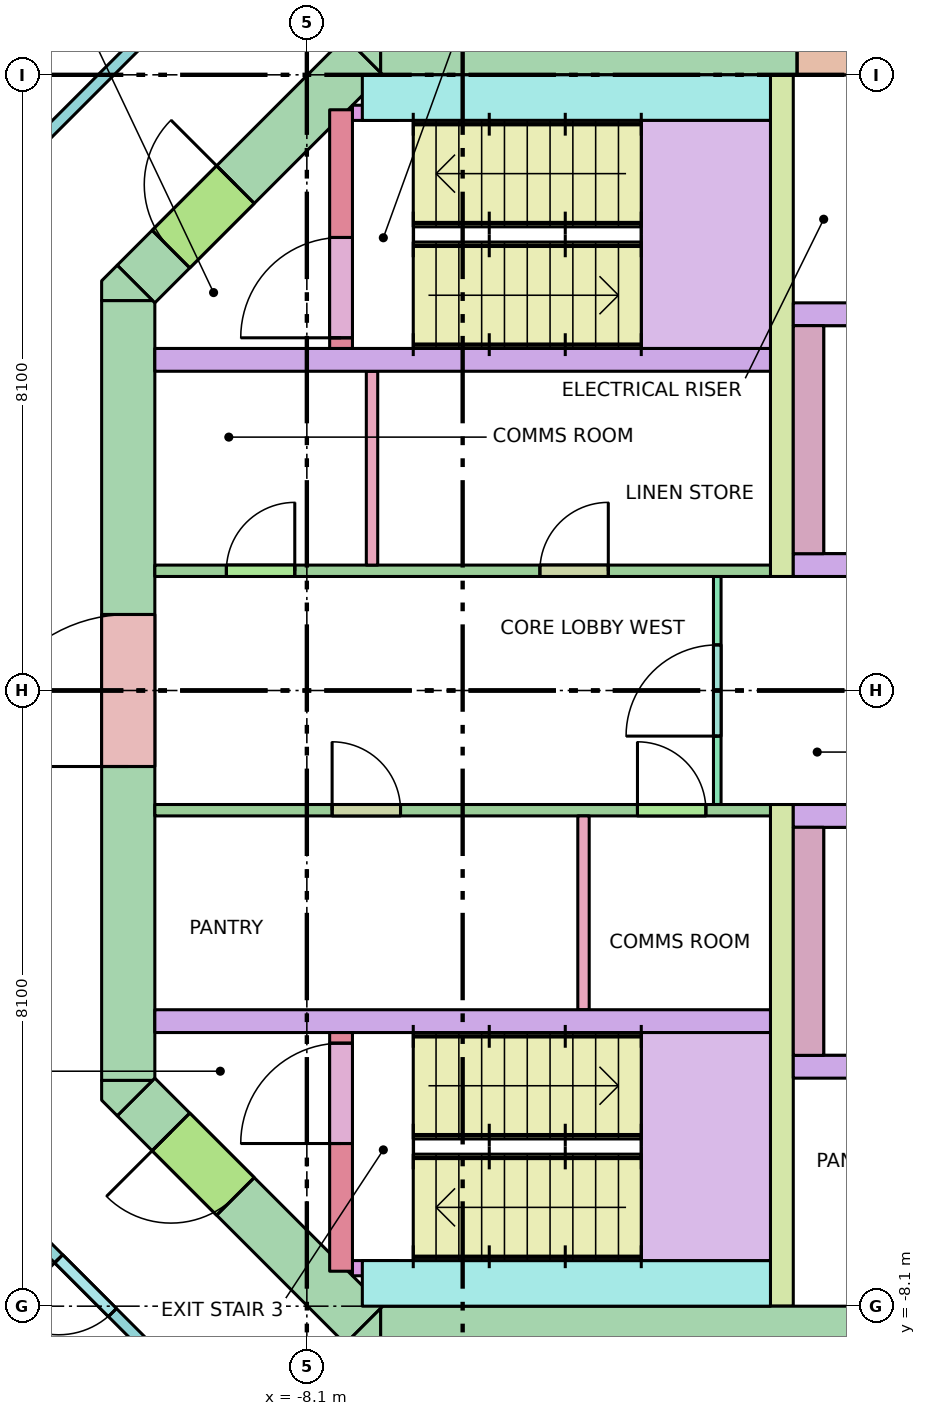
"""IFC4 building model, lengths in metres.
Left out: names, types, materials, properties, quantities, classifications, styles, units other than length and angle.
Written with IfcOpenShell. Run it as: python <this file> out.ifc"""

import sys

from ifc_helpers import new_model, si_unit, direction, frame, frame_2d, origin, place, context, subcontext, project, spatial, polyline, rectangle, outline, extrude, element, fill, save


model = new_model("IFC4")
c1 = context("Model", 3, precision=1e-05, world=origin(), true_north=direction((0.0, 1.0)))
c2 = subcontext(c1, "Body", "Model", "MODEL_VIEW")
j1 = project(units=[si_unit("LENGTHUNIT", "METRE"), si_unit("PLANEANGLEUNIT", "RADIAN")], contexts=[c1])
p1 = place(None, origin())
s1 = spatial("IfcSite", under=j1, at=p1, CompositionType="ELEMENT")
p2 = place(p1, origin())
s2 = spatial("IfcBuilding", under=s1, at=p2, CompositionType="ELEMENT")
p3 = place(p2, frame((0.0, 0.0, 176.4)))
s3 = spatial("IfcBuildingStorey", under=s2, at=p3, CompositionType="ELEMENT", Elevation=176.4)
p4 = place(p3, frame((-7.13, 8.45, -0.28), z_axis=(0.0, 0.0, 1.0), x_axis=(1.0, 0.0, 0.0)))
e1 = element("IfcWall", 1, at=p4, inside=s3, PredefinedType="SHEAR", context=c2, shape_type="SweptSolid", body=[
    extrude(rectangle(XDim=14.26, YDim=0.7, at=frame_2d((7.13, 0.0))), origin(), (0.0, 0.0, 1.0), 3.7),
])
p5 = place(p4, frame((5.48, 0.0, 0.28)))
e2 = element("IfcOpeningElement", 2, at=p5, cuts=e1, PredefinedType="OPENING", context=c2, shape_type="SweptSolid", body=[
    extrude(rectangle(XDim=0.7, YDim=2.1, at=frame_2d((0.35, 1.05))), frame((0.0, 0.36, 0.0), z_axis=(0.0, -1.0, 0.0), x_axis=(1.0, 0.0, 0.0)), (0.0, 0.0, 1.0), 0.72),
])
p6 = place(p4, frame((7.155, 0.0, 0.28)))
e3 = element("IfcOpeningElement", 3, at=p6, cuts=e1, PredefinedType="OPENING", context=c2, shape_type="SweptSolid", body=[
    extrude(rectangle(XDim=0.9, YDim=2.1, at=frame_2d((0.45, 1.05))), frame((0.0, 0.36, 0.0), z_axis=(0.0, -1.0, 0.0), x_axis=(1.0, 0.0, 0.0)), (0.0, 0.0, 1.0), 0.72),
])
p7 = place(p3, frame((-7.13, -8.45, -0.28), z_axis=(0.0, 0.0, 1.0), x_axis=(1.0, 0.0, 0.0)))
e4 = element("IfcWall", 4, at=p7, inside=s3, PredefinedType="SHEAR", context=c2, shape_type="SweptSolid", body=[
    extrude(rectangle(XDim=14.26, YDim=0.7, at=frame_2d((7.13, 0.0))), origin(), (0.0, 0.0, 1.0), 3.7),
])
p8 = place(p7, frame((8.08, 0.0, 0.28)))
e5 = element("IfcOpeningElement", 5, at=p8, cuts=e4, PredefinedType="OPENING", context=c2, shape_type="SweptSolid", body=[
    extrude(rectangle(XDim=0.7, YDim=2.1, at=frame_2d((0.35, 1.05))), frame((0.0, 0.36, 0.0), z_axis=(0.0, -1.0, 0.0), x_axis=(1.0, 0.0, 0.0)), (0.0, 0.0, 1.0), 0.72),
])
p9 = place(p7, frame((6.205, 0.0, 0.28)))
e6 = element("IfcOpeningElement", 6, at=p9, cuts=e4, PredefinedType="OPENING", context=c2, shape_type="SweptSolid", body=[
    extrude(rectangle(XDim=0.9, YDim=2.1, at=frame_2d((0.45, 1.05))), frame((0.0, 0.36, 0.0), z_axis=(0.0, -1.0, 0.0), x_axis=(1.0, 0.0, 0.0)), (0.0, 0.0, 1.0), 0.72),
])
p10 = place(p7, frame((9.967, 0.0, 0.28)))
e7 = element("IfcOpeningElement", 7, at=p10, cuts=e4, PredefinedType="OPENING", context=c2, shape_type="SweptSolid", body=[
    extrude(rectangle(XDim=0.9, YDim=2.1, at=frame_2d((0.45, 1.05))), frame((0.0, 0.36, 0.0), z_axis=(0.0, -1.0, 0.0), x_axis=(1.0, 0.0, 0.0)), (0.0, 0.0, 1.0), 0.72),
])
p11 = place(p7, frame((12.567, 0.0, 0.28)))
e8 = element("IfcOpeningElement", 8, at=p11, cuts=e4, PredefinedType="OPENING", context=c2, shape_type="SweptSolid", body=[
    extrude(rectangle(XDim=0.9, YDim=2.1, at=frame_2d((0.45, 1.05))), frame((0.0, 0.36, 0.0), z_axis=(0.0, -1.0, 0.0), x_axis=(1.0, 0.0, 0.0)), (0.0, 0.0, 1.0), 0.72),
])
p12 = place(p3, frame((-10.45, -5.13, -0.28), z_axis=(0.0, 0.0, 1.0), x_axis=(0.0, 1.0, 0.0)))
e9 = element("IfcWall", 9, at=p12, inside=s3, PredefinedType="SHEAR", context=c2, shape_type="SweptSolid", body=[
    extrude(rectangle(XDim=10.26, YDim=0.7, at=frame_2d((5.13, 0.0))), origin(), (0.0, 0.0, 1.0), 3.7),
])
p13 = place(p12, frame((4.13, 0.0, 0.28)))
e10 = element("IfcOpeningElement", 10, at=p13, cuts=e9, PredefinedType="OPENING", context=c2, shape_type="SweptSolid", body=[
    extrude(rectangle(XDim=2.0, YDim=2.1, at=frame_2d((1.0, 1.05))), frame((0.0, 0.36, 0.0), z_axis=(0.0, -1.0, 0.0), x_axis=(1.0, 0.0, 0.0)), (0.0, 0.0, 1.0), 0.72),
])
p14 = place(p3, frame((-10.347, 5.347, -0.28), z_axis=(0.0, 0.0, 1.0), x_axis=(0.707106781187, 0.707106781187, 0.0)))
e11 = element("IfcWall", 11, at=p14, inside=s3, PredefinedType="SHEAR", context=c2, shape_type="SweptSolid", body=[
    extrude(rectangle(XDim=4.243, YDim=0.7, at=frame_2d((2.121, 0.0))), origin(), (0.0, 0.0, 1.0), 3.7),
])
p15 = place(p14, frame((0.65, 0.0, 0.28)))
e12 = element("IfcOpeningElement", 12, at=p15, cuts=e11, PredefinedType="OPENING", context=c2, shape_type="SweptSolid", body=[
    extrude(rectangle(XDim=1.2, YDim=2.1, at=frame_2d((0.6, 1.05))), frame((0.0, 0.36, 0.0), z_axis=(0.0, -1.0, 0.0), x_axis=(1.0, 0.0, 0.0)), (0.0, 0.0, 1.0), 0.72),
])
p16 = place(p3, frame((-7.347, -8.347, -0.28), z_axis=(0.0, 0.0, 1.0), x_axis=(-0.707106781187, 0.707106781187, 0.0)))
e13 = element("IfcWall", 13, at=p16, inside=s3, PredefinedType="SHEAR", context=c2, shape_type="SweptSolid", body=[
    extrude(rectangle(XDim=4.243, YDim=0.7, at=frame_2d((2.121, 0.0))), origin(), (0.0, 0.0, 1.0), 3.7),
])
p17 = place(p16, frame((2.393, 0.0, 0.28)))
e14 = element("IfcOpeningElement", 14, at=p17, cuts=e13, PredefinedType="OPENING", context=c2, shape_type="SweptSolid", body=[
    extrude(rectangle(XDim=1.2, YDim=2.1, at=frame_2d((0.6, 1.05))), frame((0.0, 0.36, 0.0), z_axis=(0.0, -1.0, 0.0), x_axis=(1.0, 0.0, 0.0)), (0.0, 0.0, 1.0), 0.72),
])
p18 = place(p3, frame((0.0, 0.0, -0.28)))
e15 = element("IfcWall", 15, at=p18, inside=s3, PredefinedType="SHEAR", context=c2, shape_type="SweptSolid", body=[
    extrude(outline(polyline([(-7.39, -8.8), (-7.595, -8.595), (-7.595, -8.595), (-7.595, -8.595), (-7.13, -8.13), (-7.13, -8.8), (-7.13, -8.8), (-7.39, -8.8)])), origin(), (0.0, 0.0, 1.0), 3.7),
])
p19 = place(p3, frame((0.0, 0.0, -0.28)))
e16 = element("IfcWall", 16, at=p19, inside=s3, PredefinedType="SHEAR", context=c2, shape_type="SweptSolid", body=[
    extrude(outline(polyline([(-10.8, -5.39), (-10.8, -5.13), (-10.8, -5.13), (-10.13, -5.13), (-10.595, -5.595), (-10.595, -5.595), (-10.595, -5.595), (-10.8, -5.39)])), origin(), (0.0, 0.0, 1.0), 3.7),
])
p20 = place(p3, frame((0.0, 0.0, -0.28)))
e17 = element("IfcWall", 17, at=p20, inside=s3, PredefinedType="SHEAR", context=c2, shape_type="SweptSolid", body=[
    extrude(outline(polyline([(-10.595, 5.595), (-10.595, 5.595), (-10.595, 5.595), (-10.13, 5.13), (-10.8, 5.13), (-10.8, 5.13), (-10.8, 5.39), (-10.595, 5.595)])), origin(), (0.0, 0.0, 1.0), 3.7),
])
p21 = place(p3, frame((0.0, 0.0, -0.28)))
e18 = element("IfcWall", 18, at=p21, inside=s3, PredefinedType="SHEAR", context=c2, shape_type="SweptSolid", body=[
    extrude(outline(polyline([(-7.39, 8.8), (-7.13, 8.8), (-7.13, 8.8), (-7.13, 8.13), (-7.595, 8.595), (-7.595, 8.595), (-7.595, 8.595), (-7.39, 8.8)])), origin(), (0.0, 0.0, 1.0), 3.7),
])
for number, where, z_axis, x_axis in (
    (19, (-10.1, 4.35, 0.0), (0.0, 0.0, 1.0), (1.0, 0.0, 0.0)),
    (20, (-10.1, -4.35, 0.0), (0.0, 0.0, 1.0), (1.0, 0.0, 0.0)),
):
    element("IfcWall", number, at=place(p3, frame(where, z_axis=z_axis, x_axis=x_axis)), inside=s3, PredefinedType="SOLIDWALL", context=c2, shape_type="SweptSolid", body=[
        extrude(rectangle(XDim=8.1, YDim=0.3, at=frame_2d((4.05, 0.0))), origin(), (0.0, 0.0, 1.0), 3.42),
    ])
for number, where, z_axis, x_axis in (
    (21, (-1.85, 1.5, 0.0), (0.0, 0.0, 1.0), (0.0, 1.0, 0.0)),
    (22, (-1.85, -8.1, 0.0), (0.0, 0.0, 1.0), (0.0, 1.0, 0.0)),
):
    element("IfcWall", number, at=place(p3, frame(where, z_axis=z_axis, x_axis=x_axis)), inside=s3, PredefinedType="SHEAR", context=c2, shape_type="SweptSolid", body=[
        extrude(rectangle(XDim=6.6, YDim=0.3, at=frame_2d((3.3, 0.0))), origin(), (0.0, 0.0, 1.0), 3.42),
    ])
p22 = place(p3, frame((-1.7, 1.65, 0.0), z_axis=(0.0, 0.0, 1.0), x_axis=(1.0, 0.0, 0.0)))
e23 = element("IfcWall", 23, at=p22, inside=s3, PredefinedType="SOLIDWALL", context=c2, shape_type="SweptSolid", body=[
    extrude(rectangle(XDim=3.4, YDim=0.3, at=frame_2d((1.7, 0.0))), origin(), (0.0, 0.0, 1.0), 3.42),
])
p23 = place(p22, frame((1.15, 0.0, 0.0)))
e24 = element("IfcOpeningElement", 24, at=p23, cuts=e23, PredefinedType="OPENING", context=c2, shape_type="SweptSolid", body=[
    extrude(rectangle(XDim=1.1, YDim=2.1, at=frame_2d((0.55, 1.05))), frame((0.0, 0.16, 0.0), z_axis=(0.0, -1.0, 0.0), x_axis=(1.0, 0.0, 0.0)), (0.0, 0.0, 1.0), 0.32),
])
p24 = place(p3, frame((-1.7, -1.65, 0.0), z_axis=(0.0, 0.0, 1.0), x_axis=(1.0, 0.0, 0.0)))
e25 = element("IfcWall", 25, at=p24, inside=s3, PredefinedType="SOLIDWALL", context=c2, shape_type="SweptSolid", body=[
    extrude(rectangle(XDim=3.4, YDim=0.3, at=frame_2d((1.7, 0.0))), origin(), (0.0, 0.0, 1.0), 3.42),
])
p25 = place(p24, frame((1.15, 0.0, 0.0)))
e26 = element("IfcOpeningElement", 26, at=p25, cuts=e25, PredefinedType="OPENING", context=c2, shape_type="SweptSolid", body=[
    extrude(rectangle(XDim=1.1, YDim=2.1, at=frame_2d((0.55, 1.05))), frame((0.0, 0.16, 0.0), z_axis=(0.0, -1.0, 0.0), x_axis=(1.0, 0.0, 0.0)), (0.0, 0.0, 1.0), 0.32),
])
for number, where, z_axis, x_axis in (
    (27, (-1.5, 1.8, 0.0), (0.0, 0.0, 1.0), (0.0, 1.0, 0.0)),
    (28, (-1.5, -4.8, 0.0), (0.0, 0.0, 1.0), (0.0, 1.0, 0.0)),
):
    element("IfcWall", number, at=place(p3, frame(where, z_axis=z_axis, x_axis=x_axis)), inside=s3, PredefinedType="SOLIDWALL", context=c2, shape_type="SweptSolid", body=[
        extrude(rectangle(XDim=3.0, YDim=0.4, at=frame_2d((1.5, 0.0))), origin(), (0.0, 0.0, 1.0), 3.42),
    ])
for number, where, z_axis, x_axis in (
    (29, (-1.7, 4.95, 0.0), (0.0, 0.0, 1.0), (1.0, 0.0, 0.0)),
    (30, (-1.7, -4.95, 0.0), (0.0, 0.0, 1.0), (1.0, 0.0, 0.0)),
):
    element("IfcWall", number, at=place(p3, frame(where, z_axis=z_axis, x_axis=x_axis)), inside=s3, PredefinedType="SOLIDWALL", context=c2, shape_type="SweptSolid", body=[
        extrude(rectangle(XDim=3.4, YDim=0.3, at=frame_2d((1.7, 0.0))), origin(), (0.0, 0.0, 1.0), 3.42),
    ])
p26 = place(p3, frame((-7.65, 4.5, 0.0), z_axis=(0.0, 0.0, 1.0), x_axis=(0.0, 1.0, 0.0)))
e31 = element("IfcWall", 31, at=p26, inside=s3, PredefinedType="SHEAR", context=c2, shape_type="SweptSolid", body=[
    extrude(rectangle(XDim=3.14, YDim=0.3, at=frame_2d((1.57, 0.0))), origin(), (0.0, 0.0, 1.0), 3.42),
])
p27 = place(p26, frame((0.14, 0.0, 0.0)))
e32 = element("IfcOpeningElement", 32, at=p27, cuts=e31, PredefinedType="OPENING", context=c2, shape_type="SweptSolid", body=[
    extrude(rectangle(XDim=1.32, YDim=2.1, at=frame_2d((0.66, 1.05))), frame((0.0, 0.16, 0.0), z_axis=(0.0, -1.0, 0.0), x_axis=(1.0, 0.0, 0.0)), (0.0, 0.0, 1.0), 0.32),
])
p28 = place(p3, frame((-7.37, 7.8, 0.0), z_axis=(0.0, 0.0, 1.0), x_axis=(1.0, 0.0, 0.0)))
e33 = element("IfcWall", 33, at=p28, inside=s3, PredefinedType="SHEAR", context=c2, shape_type="SweptSolid", body=[
    extrude(rectangle(XDim=5.37, YDim=0.6, at=frame_2d((2.685, 0.0))), origin(), (0.0, 0.0, 1.0), 3.42),
])
p29 = place(p3, frame((-7.65, -7.64, 0.0), z_axis=(0.0, 0.0, 1.0), x_axis=(0.0, 1.0, 0.0)))
e34 = element("IfcWall", 34, at=p29, inside=s3, PredefinedType="SHEAR", context=c2, shape_type="SweptSolid", body=[
    extrude(rectangle(XDim=3.14, YDim=0.3, at=frame_2d((1.57, 0.0))), origin(), (0.0, 0.0, 1.0), 3.42),
])
p30 = place(p29, frame((1.68, 0.0, 0.0)))
e35 = element("IfcOpeningElement", 35, at=p30, cuts=e34, PredefinedType="OPENING", context=c2, shape_type="SweptSolid", body=[
    extrude(rectangle(XDim=1.32, YDim=2.1, at=frame_2d((0.66, 1.05))), frame((0.0, 0.16, 0.0), z_axis=(0.0, -1.0, 0.0), x_axis=(1.0, 0.0, 0.0)), (0.0, 0.0, 1.0), 0.32),
])
for number, where, z_axis, x_axis in (
    (36, (-7.5, 7.6, 0.0), (0.0, 0.0, 1.0), (1.0, 0.0, 0.0)),
    (37, (-7.5, -7.6, 0.0), (0.0, 0.0, 1.0), (1.0, 0.0, 0.0)),
):
    element("IfcWall", number, at=place(p3, frame(where, z_axis=z_axis, x_axis=x_axis)), inside=s3, PredefinedType="SHEAR", context=c2, shape_type="SweptSolid", body=[
        extrude(rectangle(XDim=0.6, YDim=0.2, at=frame_2d((0.3, 0.0))), origin(), (0.0, 0.0, 1.0), 3.42),
    ])
p31 = place(p3, frame((-7.37, -7.8, 0.0), z_axis=(0.0, 0.0, 1.0), x_axis=(1.0, 0.0, 0.0)))
e38 = element("IfcWall", 38, at=p31, inside=s3, PredefinedType="SHEAR", context=c2, shape_type="SweptSolid", body=[
    extrude(rectangle(XDim=5.37, YDim=0.6, at=frame_2d((2.685, 0.0))), origin(), (0.0, 0.0, 1.0), 3.42),
])
p32 = place(p3, frame((-2.7, -1.5, 0.0), z_axis=(0.0, 0.0, 1.0), x_axis=(0.0, 1.0, 0.0)))
e39 = element("IfcWall", 39, at=p32, inside=s3, PredefinedType="PARTITIONING", context=c2, shape_type="SweptSolid", body=[
    extrude(rectangle(XDim=3.0, YDim=0.1, at=frame_2d((1.5, 0.0))), origin(), (0.0, 0.0, 1.0), 3.42),
])
p33 = place(p32, frame((0.9, 0.0, 0.0)))
e40 = element("IfcOpeningElement", 40, at=p33, cuts=e39, PredefinedType="OPENING", context=c2, shape_type="SweptSolid", body=[
    extrude(rectangle(XDim=1.2, YDim=2.1, at=frame_2d((0.6, 1.05))), frame((0.0, 0.06, 0.0), z_axis=(0.0, -1.0, 0.0), x_axis=(1.0, 0.0, 0.0)), (0.0, 0.0, 1.0), 0.12),
])
for number, where, z_axis, x_axis in (
    (41, (-7.242, 1.65, 0.0), (0.0, 0.0, 1.0), (0.0, 1.0, 0.0)),
    (42, (-4.46, -4.2, 0.0), (0.0, 0.0, 1.0), (0.0, 1.0, 0.0)),
):
    element("IfcWall", number, at=place(p3, frame(where, z_axis=z_axis, x_axis=x_axis)), inside=s3, PredefinedType="PARTITIONING", context=c2, shape_type="SweptSolid", body=[
        extrude(rectangle(XDim=2.55, YDim=0.15, at=frame_2d((1.275, 0.0))), origin(), (0.0, 0.0, 1.0), 3.42),
    ])
p34 = place(p3, frame((-10.1, 1.575, 0.0), z_axis=(0.0, 0.0, 1.0), x_axis=(1.0, 0.0, 0.0)))
e43 = element("IfcWall", 43, at=p34, inside=s3, PredefinedType="PARTITIONING", context=c2, shape_type="SweptSolid", body=[
    extrude(rectangle(XDim=8.1, YDim=0.15, at=frame_2d((4.05, 0.0))), origin(), (0.0, 0.0, 1.0), 3.42),
])
p35 = place(p34, frame((0.941, 0.0, 0.0)))
e44 = element("IfcOpeningElement", 44, at=p35, cuts=e43, PredefinedType="OPENING", context=c2, shape_type="SweptSolid", body=[
    extrude(rectangle(XDim=0.9, YDim=2.1, at=frame_2d((0.45, 1.05))), frame((0.0, 0.085, 0.0), z_axis=(0.0, -1.0, 0.0), x_axis=(1.0, 0.0, 0.0)), (0.0, 0.0, 1.0), 0.17),
])
p36 = place(p34, frame((5.066, 0.0, 0.0)))
e45 = element("IfcOpeningElement", 45, at=p36, cuts=e43, PredefinedType="OPENING", context=c2, shape_type="SweptSolid", body=[
    extrude(rectangle(XDim=0.9, YDim=2.1, at=frame_2d((0.45, 1.05))), frame((0.0, 0.085, 0.0), z_axis=(0.0, -1.0, 0.0), x_axis=(1.0, 0.0, 0.0)), (0.0, 0.0, 1.0), 0.17),
])
p37 = place(p3, frame((-10.1, -1.575, 0.0), z_axis=(0.0, 0.0, 1.0), x_axis=(1.0, 0.0, 0.0)))
e46 = element("IfcWall", 46, at=p37, inside=s3, PredefinedType="PARTITIONING", context=c2, shape_type="SweptSolid", body=[
    extrude(rectangle(XDim=8.1, YDim=0.15, at=frame_2d((4.05, 0.0))), origin(), (0.0, 0.0, 1.0), 3.42),
])
p38 = place(p37, frame((2.333, 0.0, 0.0)))
e47 = element("IfcOpeningElement", 47, at=p38, cuts=e46, PredefinedType="OPENING", context=c2, shape_type="SweptSolid", body=[
    extrude(rectangle(XDim=0.9, YDim=2.1, at=frame_2d((0.45, 1.05))), frame((0.0, 0.085, 0.0), z_axis=(0.0, -1.0, 0.0), x_axis=(1.0, 0.0, 0.0)), (0.0, 0.0, 1.0), 0.17),
])
p39 = place(p37, frame((6.35, 0.0, 0.0)))
e48 = element("IfcOpeningElement", 48, at=p39, cuts=e46, PredefinedType="OPENING", context=c2, shape_type="SweptSolid", body=[
    extrude(rectangle(XDim=0.9, YDim=2.1, at=frame_2d((0.45, 1.05))), frame((0.0, 0.085, 0.0), z_axis=(0.0, -1.0, 0.0), x_axis=(1.0, 0.0, 0.0)), (0.0, 0.0, 1.0), 0.17),
])
p40 = place(p3, frame((-8.204, -10.638, 0.0), z_axis=(0.0, 0.0, 1.0), x_axis=(-0.707106781187, 0.707106781187, 0.0)))
e49 = element("IfcWall", 49, at=p40, inside=s3, PredefinedType="PARTITIONING", context=c2, shape_type="SweptSolid", body=[
    extrude(rectangle(XDim=6.271, YDim=0.15, at=frame_2d((3.135, 0.0))), origin(), (0.0, 0.0, 1.0), 2.62),
])
p41 = place(p40, frame((3.471, 0.0, 0.0)))
e50 = element("IfcOpeningElement", 50, at=p41, cuts=e49, PredefinedType="OPENING", context=c2, shape_type="SweptSolid", body=[
    extrude(rectangle(XDim=1.0, YDim=2.1, at=frame_2d((0.5, 1.05))), frame((0.0, 0.085, 0.0), z_axis=(0.0, -1.0, 0.0), x_axis=(1.0, 0.0, 0.0)), (0.0, 0.0, 1.0), 0.17),
])
p42 = place(p3, frame((-12.638, 6.204, 0.0), z_axis=(0.0, 0.0, 1.0), x_axis=(0.707106781187, 0.707106781187, 0.0)))
e51 = element("IfcWall", 51, at=p42, inside=s3, PredefinedType="PARTITIONING", context=c2, shape_type="SweptSolid", body=[
    extrude(rectangle(XDim=6.271, YDim=0.15, at=frame_2d((3.135, 0.0))), origin(), (0.0, 0.0, 1.0), 2.62),
])
p43 = place(p42, frame((4.935, 0.0, 0.0)))
e52 = element("IfcOpeningElement", 52, at=p43, cuts=e51, PredefinedType="OPENING", context=c2, shape_type="SweptSolid", body=[
    extrude(rectangle(XDim=0.9, YDim=2.1, at=frame_2d((0.45, 1.05))), frame((0.0, 0.085, 0.0), z_axis=(0.0, -1.0, 0.0), x_axis=(1.0, 0.0, 0.0)), (0.0, 0.0, 1.0), 0.17),
])
p44 = place(p27, origin())
e53 = element("IfcDoor", 53, at=p44, inside=s3, OperationType="DOUBLE_DOOR_SINGLE_SWING", PredefinedType="DOOR", context=c2, shape_type="SweptSolid", body=[
    extrude(rectangle(XDim=1.32, YDim=2.1, at=frame_2d((0.66, 1.05))), frame((0.0, 0.025, 0.0), z_axis=(0.0, -1.0, 0.0), x_axis=(1.0, 0.0, 0.0)), (0.0, 0.0, 1.0), 0.05),
])
fill(e32, e53)
p45 = place(p15, origin())
e54 = element("IfcDoor", 54, at=p45, inside=s3, OperationType="SINGLE_SWING_RIGHT", PredefinedType="DOOR", context=c2, shape_type="SweptSolid", body=[
    extrude(rectangle(XDim=1.2, YDim=2.1, at=frame_2d((0.6, 1.05))), frame((0.0, 0.025, 0.0), z_axis=(0.0, -1.0, 0.0), x_axis=(1.0, 0.0, 0.0)), (0.0, 0.0, 1.0), 0.05),
])
fill(e12, e54)
p46 = place(p30, origin())
e55 = element("IfcDoor", 55, at=p46, inside=s3, OperationType="DOUBLE_DOOR_SINGLE_SWING", PredefinedType="DOOR", context=c2, shape_type="SweptSolid", body=[
    extrude(rectangle(XDim=1.32, YDim=2.1, at=frame_2d((0.66, 1.05))), frame((0.0, 0.025, 0.0), z_axis=(0.0, -1.0, 0.0), x_axis=(1.0, 0.0, 0.0)), (0.0, 0.0, 1.0), 0.05),
])
fill(e35, e55)
p47 = place(p17, origin())
e56 = element("IfcDoor", 56, at=p47, inside=s3, OperationType="SINGLE_SWING_RIGHT", PredefinedType="DOOR", context=c2, shape_type="SweptSolid", body=[
    extrude(rectangle(XDim=1.2, YDim=2.1, at=frame_2d((0.6, 1.05))), frame((0.0, 0.025, 0.0), z_axis=(0.0, -1.0, 0.0), x_axis=(1.0, 0.0, 0.0)), (0.0, 0.0, 1.0), 0.05),
])
fill(e14, e56)
p48 = place(p13, origin())
e57 = element("IfcDoor", 57, at=p48, inside=s3, OperationType="DOUBLE_DOOR_SINGLE_SWING", PredefinedType="DOOR", context=c2, shape_type="SweptSolid", body=[
    extrude(rectangle(XDim=2.0, YDim=2.1, at=frame_2d((1.0, 1.05))), frame((0.0, 0.025, 0.0), z_axis=(0.0, -1.0, 0.0), x_axis=(1.0, 0.0, 0.0)), (0.0, 0.0, 1.0), 0.05),
])
fill(e10, e57)
p49 = place(p33, origin())
e58 = element("IfcDoor", 58, at=p49, inside=s3, OperationType="SINGLE_SWING_LEFT", PredefinedType="DOOR", context=c2, shape_type="SweptSolid", body=[
    extrude(rectangle(XDim=1.2, YDim=2.1, at=frame_2d((0.6, 1.05))), frame((0.0, 0.025, 0.0), z_axis=(0.0, -1.0, 0.0), x_axis=(1.0, 0.0, 0.0)), (0.0, 0.0, 1.0), 0.05),
])
fill(e40, e58)
p50 = place(p35, origin())
e59 = element("IfcDoor", 59, at=p50, inside=s3, OperationType="SINGLE_SWING_RIGHT", PredefinedType="DOOR", context=c2, shape_type="SweptSolid", body=[
    extrude(rectangle(XDim=0.9, YDim=2.1, at=frame_2d((0.45, 1.05))), frame((0.0, 0.025, 0.0), z_axis=(0.0, -1.0, 0.0), x_axis=(1.0, 0.0, 0.0)), (0.0, 0.0, 1.0), 0.05),
])
fill(e44, e59)
p51 = place(p36, origin())
e60 = element("IfcDoor", 60, at=p51, inside=s3, OperationType="SINGLE_SWING_RIGHT", PredefinedType="DOOR", context=c2, shape_type="SweptSolid", body=[
    extrude(rectangle(XDim=0.9, YDim=2.1, at=frame_2d((0.45, 1.05))), frame((0.0, 0.025, 0.0), z_axis=(0.0, -1.0, 0.0), x_axis=(1.0, 0.0, 0.0)), (0.0, 0.0, 1.0), 0.05),
])
fill(e45, e60)
p52 = place(p38, origin())
e61 = element("IfcDoor", 61, at=p52, inside=s3, OperationType="SINGLE_SWING_LEFT", PredefinedType="DOOR", context=c2, shape_type="SweptSolid", body=[
    extrude(rectangle(XDim=0.9, YDim=2.1, at=frame_2d((0.45, 1.05))), frame((0.0, 0.025, 0.0), z_axis=(0.0, -1.0, 0.0), x_axis=(1.0, 0.0, 0.0)), (0.0, 0.0, 1.0), 0.05),
])
fill(e47, e61)
p53 = place(p39, origin())
e62 = element("IfcDoor", 62, at=p53, inside=s3, OperationType="SINGLE_SWING_LEFT", PredefinedType="DOOR", context=c2, shape_type="SweptSolid", body=[
    extrude(rectangle(XDim=0.9, YDim=2.1, at=frame_2d((0.45, 1.05))), frame((0.0, 0.025, 0.0), z_axis=(0.0, -1.0, 0.0), x_axis=(1.0, 0.0, 0.0)), (0.0, 0.0, 1.0), 0.05),
])
fill(e48, e62)
p54 = place(p41, origin())
e63 = element("IfcDoor", 63, at=p54, inside=s3, OperationType="SINGLE_SWING_RIGHT", PredefinedType="DOOR", context=c2, shape_type="SweptSolid", body=[
    extrude(rectangle(XDim=1.0, YDim=2.1, at=frame_2d((0.5, 1.05))), frame((0.0, 0.025, 0.0), z_axis=(0.0, -1.0, 0.0), x_axis=(1.0, 0.0, 0.0)), (0.0, 0.0, 1.0), 0.05),
])
fill(e50, e63)
save(model, sys.argv[1])
